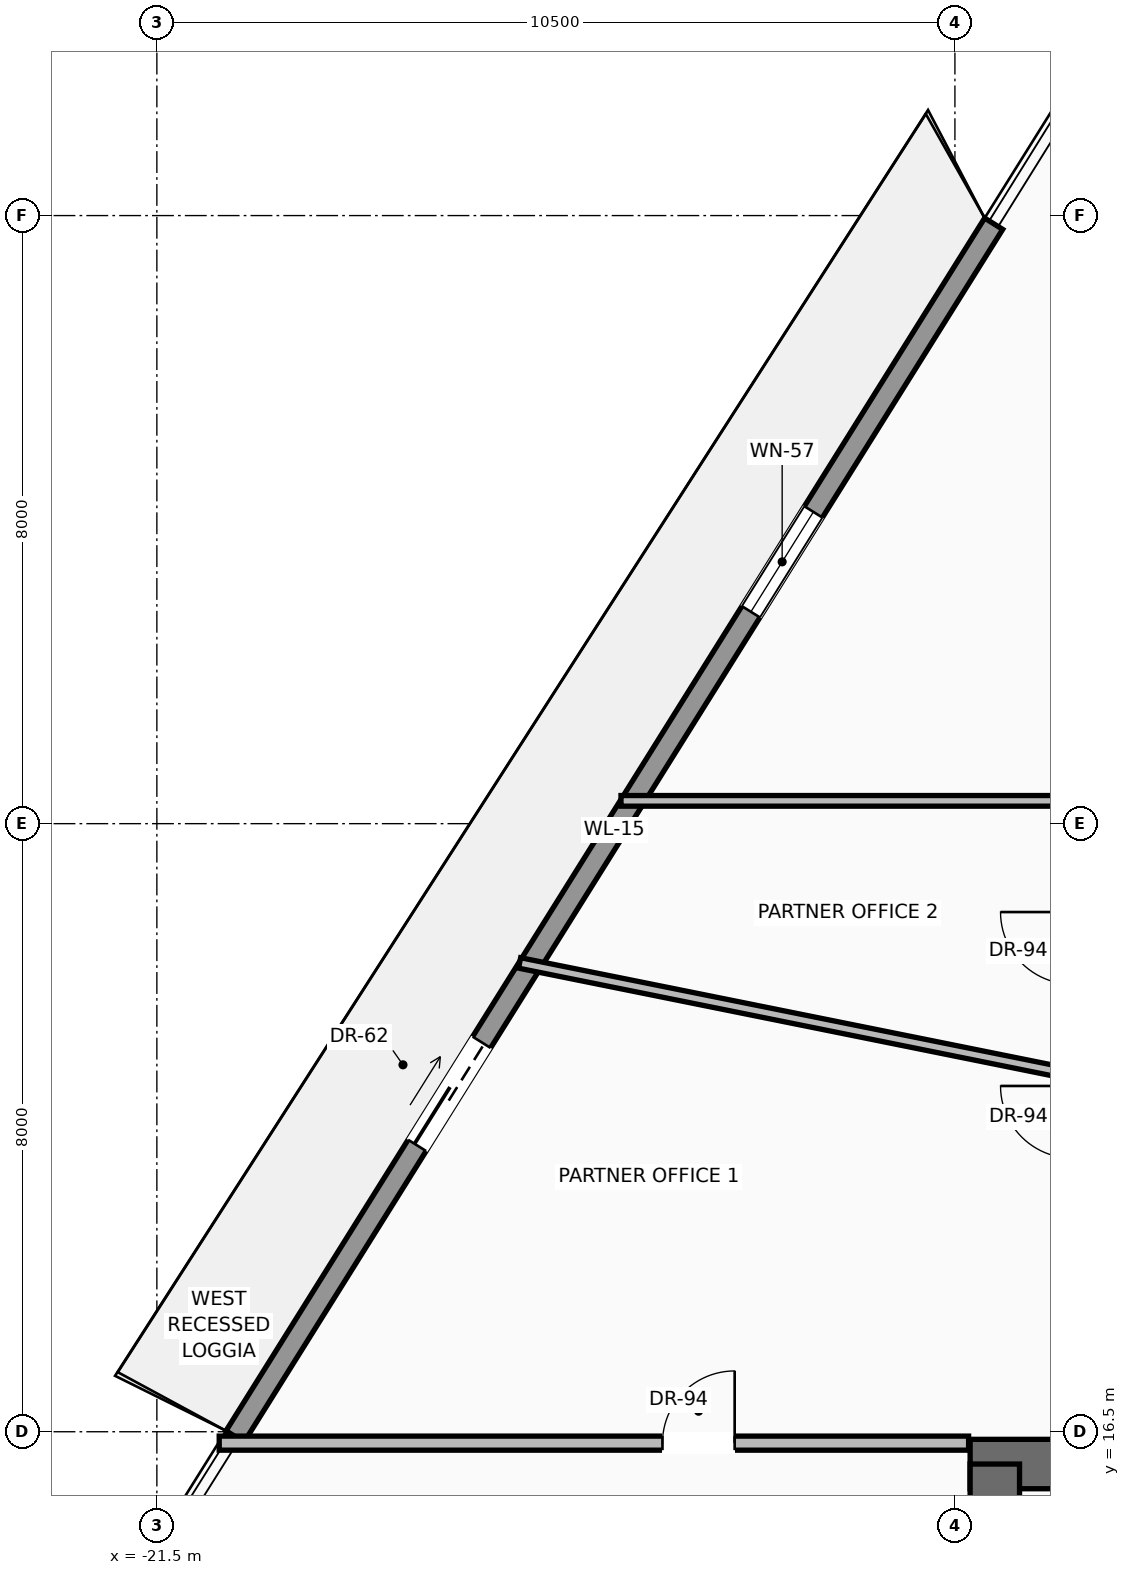
"""IFC4 building model, lengths in metres.
Left out: names, types, materials, properties, quantities, classifications, styles, units other than length and angle.
Written with IfcOpenShell. Run it as: python <this file> out.ifc"""

import sys

from ifc_helpers import new_model, si_unit, direction, frame, frame_2d, origin, place, context, subcontext, project, spatial, rectangle, extrude, source, transform, mapped, element, fill, save


model = new_model("IFC4")
c1 = context("Model", 3, precision=1e-05, world=origin(), true_north=direction((0.0, 1.0)))
c2 = subcontext(c1, "Body", "Model", "MODEL_VIEW")
j1 = project(units=[si_unit("LENGTHUNIT", "METRE"), si_unit("PLANEANGLEUNIT", "RADIAN")], contexts=[c1])
p1 = place(None, origin())
s1 = spatial("IfcSite", under=j1, at=p1, CompositionType="ELEMENT")
p2 = place(p1, origin())
s2 = spatial("IfcBuilding", under=s1, at=p2, CompositionType="ELEMENT")
p3 = place(p2, frame((0.0, 0.0, 178.4)))
s3 = spatial("IfcBuildingStorey", under=s2, at=p3, CompositionType="ELEMENT", Elevation=178.4)
p4 = place(p3, frame((-10.8, 16.075, 0.0), z_axis=(0.0, 0.0, 1.0), x_axis=(1.0, 0.0, 0.0)))
e1 = element("IfcWall", 1, at=p4, inside=s3, PredefinedType="SHEAR", context=c2, shape_type="SweptSolid", body=[
    extrude(rectangle(XDim=21.6, YDim=0.65, at=frame_2d((10.8, 0.0))), origin(), (0.0, 0.0, 1.0), 3.47),
])
p5 = place(p4, frame((3.37, 0.0, 0.0)))
e2 = element("IfcOpeningElement", 2, at=p5, cuts=e1, PredefinedType="OPENING", context=c2, shape_type="SweptSolid", body=[
    extrude(rectangle(XDim=1.3, YDim=2.3, at=frame_2d((0.65, 1.15))), frame((0.0, 0.335, 0.0), z_axis=(0.0, -1.0, 0.0), x_axis=(1.0, 0.0, 0.0)), (0.0, 0.0, 1.0), 0.67),
])
p6 = place(p4, frame((9.8, 0.0, 0.0)))
e3 = element("IfcOpeningElement", 3, at=p6, cuts=e1, PredefinedType="OPENING", context=c2, shape_type="SweptSolid", body=[
    extrude(rectangle(XDim=2.0, YDim=2.4, at=frame_2d((1.0, 1.2))), frame((0.0, 0.335, 0.0), z_axis=(0.0, -1.0, 0.0), x_axis=(1.0, 0.0, 0.0)), (0.0, 0.0, 1.0), 0.67),
])
p7 = place(p3, frame((-10.475, 0.525, 0.0), z_axis=(0.0, 0.0, 1.0), x_axis=(0.0, 1.0, 0.0)))
e4 = element("IfcWall", 4, at=p7, inside=s3, PredefinedType="SHEAR", context=c2, shape_type="SweptSolid", body=[
    extrude(rectangle(XDim=15.55, YDim=0.65, at=frame_2d((7.775, 0.0))), origin(), (0.0, 0.0, 1.0), 3.47),
])
p8 = place(p3, frame((-20.471, 16.438, 0.0), z_axis=(0.0, 0.0, 1.0), x_axis=(0.530368533609, 0.847767195967, 0.0)))
e5 = element("IfcWall", 5, at=p8, inside=s3, PredefinedType="SOLIDWALL", context=c2, shape_type="SweptSolid", body=[
    extrude(rectangle(XDim=18.82, YDim=0.28, at=frame_2d((9.41, 0.0))), origin(), (0.0, 0.0, 1.0), 3.05),
])
p9 = place(p8, frame((4.517, 0.0, 0.0)))
e6 = element("IfcOpeningElement", 6, at=p9, cuts=e5, PredefinedType="OPENING", context=c2, shape_type="SweptSolid", body=[
    extrude(rectangle(XDim=1.6, YDim=2.35, at=frame_2d((0.8, 1.175))), frame((0.0, 0.15, 0.0), z_axis=(0.0, -1.0, 0.0), x_axis=(1.0, 0.0, 0.0)), (0.0, 0.0, 1.0), 0.3),
])
p10 = place(p8, frame((12.798, 0.0, 0.9)))
e7 = element("IfcOpeningElement", 7, at=p10, cuts=e5, PredefinedType="OPENING", context=c2, shape_type="SweptSolid", body=[
    extrude(rectangle(XDim=1.55, YDim=1.85, at=frame_2d((0.775, 0.925))), frame((0.0, 0.15, 0.0), z_axis=(0.0, -1.0, 0.0), x_axis=(1.0, 0.0, 0.0)), (0.0, 0.0, 1.0), 0.3),
])
p11 = place(p3, frame((-20.68, 16.35, 0.0), z_axis=(0.0, 0.0, 1.0), x_axis=(1.0, 0.0, 0.0)))
e8 = element("IfcWall", 8, at=p11, inside=s3, PredefinedType="PARTITIONING", context=c2, shape_type="SweptSolid", body=[
    extrude(rectangle(XDim=9.86, YDim=0.185, at=frame_2d((4.93, 0.0))), origin(), (0.0, 0.0, 1.0), 3.462),
])
p12 = place(p11, frame((5.832, 0.0, 0.0)))
e9 = element("IfcOpeningElement", 9, at=p12, cuts=e8, PredefinedType="OPENING", context=c2, shape_type="SweptSolid", body=[
    extrude(rectangle(XDim=0.95, YDim=2.2, at=frame_2d((0.475, 1.1))), frame((0.0, 0.103, 0.0), z_axis=(0.0, -1.0, 0.0), x_axis=(1.0, 0.0, 0.0)), (0.0, 0.0, 1.0), 0.205),
])
p13 = place(p3, frame((-16.728, 22.667, 0.0), z_axis=(0.0, 0.0, 1.0), x_axis=(0.980268299124, -0.197671600726, 0.0)))
e10 = element("IfcWall", 10, at=p13, inside=s3, PredefinedType="PARTITIONING", context=c2, shape_type="SweptSolid", body=[
    extrude(rectangle(XDim=7.424, YDim=0.14, at=frame_2d((3.712, 0.0))), origin(), (0.0, 0.0, 1.0), 3.049),
])
p14 = place(p3, frame((-15.394, 24.8, 0.0), z_axis=(0.0, 0.0, 1.0), x_axis=(1.0, 0.0, 0.0)))
e11 = element("IfcWall", 11, at=p14, inside=s3, PredefinedType="PARTITIONING", context=c2, shape_type="SweptSolid", body=[
    extrude(rectangle(XDim=5.944, YDim=0.14, at=frame_2d((2.972, 0.0))), origin(), (0.0, 0.0, 1.0), 3.462),
])
m1 = source(origin(), c2, "Body", "SweptSolid", [
    extrude(rectangle(XDim=1.6, YDim=2.35, at=frame_2d((0.8, 1.175))), frame((0.0, 0.025, 0.0), z_axis=(0.0, -1.0, 0.0), x_axis=(1.0, 0.0, 0.0)), (0.0, 0.0, 1.0), 0.05),
])
p15 = place(p9, origin())
e12 = element("IfcDoor", 12, at=p15, inside=s3, OperationType="SLIDING_TO_LEFT", PredefinedType="DOOR", context=c2, shape_type="MappedRepresentation", body=[
    mapped(m1, transform((0.0, 0.0, 0.0), scale=1.0)),
])
fill(e6, e12)
m2 = source(origin(), c2, "Body", "SweptSolid", [
    extrude(rectangle(XDim=1.55, YDim=1.85, at=frame_2d((0.775, 0.925))), frame((0.0, 0.03, 0.0), z_axis=(0.0, -1.0, 0.0), x_axis=(1.0, 0.0, 0.0)), (0.0, 0.0, 1.0), 0.06),
])
p16 = place(p10, origin())
e13 = element("IfcWindow", 13, at=p16, inside=s3, PartitioningType="SINGLE_PANEL", PredefinedType="WINDOW", context=c2, shape_type="MappedRepresentation", body=[
    mapped(m2, transform((0.0, 0.0, 0.0), scale=1.0)),
])
fill(e7, e13)
m3 = source(origin(), c2, "Body", "SweptSolid", [
    extrude(rectangle(XDim=0.95, YDim=2.2, at=frame_2d((0.475, 1.1))), frame((0.0, 0.025, 0.0), z_axis=(0.0, -1.0, 0.0), x_axis=(1.0, 0.0, 0.0)), (0.0, 0.0, 1.0), 0.05),
])
p17 = place(p12, origin())
e14 = element("IfcDoor", 14, at=p17, inside=s3, OperationType="SINGLE_SWING_RIGHT", PredefinedType="DOOR", context=c2, shape_type="MappedRepresentation", body=[
    mapped(m3, transform((0.0, 0.0, 0.0), scale=1.0)),
])
fill(e9, e14)
save(model, sys.argv[1])
